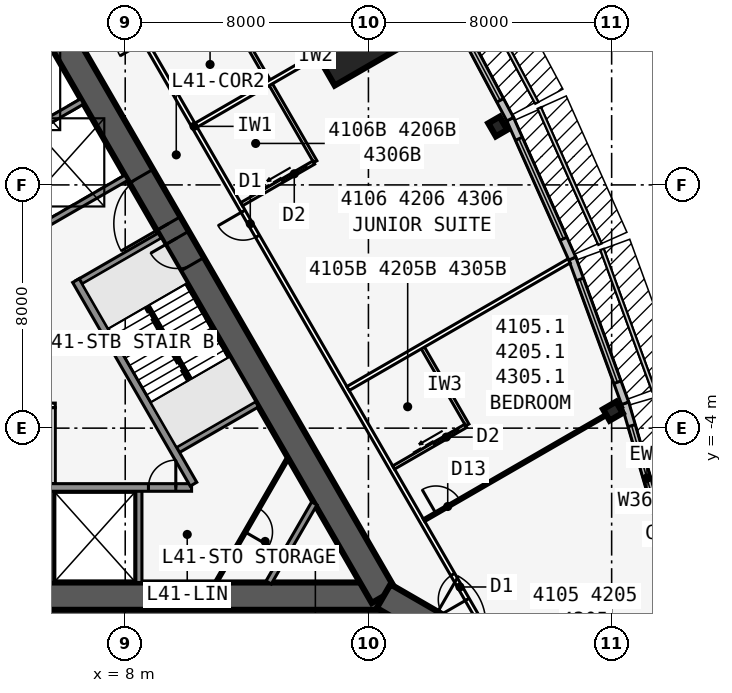
"""IFC4 building model, lengths in metres.
Left out: names, types, materials, properties, quantities, classifications, styles, units other than length and angle.
Written with IfcOpenShell. Run it as: python <this file> out.ifc"""

import sys

from ifc_helpers import new_model, si_unit, direction, frame, frame_2d, origin, origin_2d, place, context, subcontext, project, spatial, rectangle, i_section, extrude, element, fill, save


model = new_model("IFC4")
c1 = context("Model", 3, precision=1e-05, world=origin(), true_north=direction((0.0, 1.0)))
c2 = subcontext(c1, "Body", "Model", "MODEL_VIEW")
j1 = project(units=[si_unit("LENGTHUNIT", "METRE"), si_unit("PLANEANGLEUNIT", "RADIAN")], contexts=[c1])
p1 = place(None, origin())
s1 = spatial("IfcSite", under=j1, at=p1, CompositionType="ELEMENT")
p2 = place(p1, origin())
s2 = spatial("IfcBuilding", under=s1, at=p2, CompositionType="ELEMENT")
p3 = place(p2, frame((0.0, 0.0, 155.5)))
s3 = spatial("IfcBuildingStorey", under=s2, at=p3, CompositionType="ELEMENT", Elevation=155.5)
p4 = place(p3, frame((-16.5, -9.526, 0.0), z_axis=(0.0, 0.0, 1.0), x_axis=(1.0, 0.0, 0.0)))
e1 = element("IfcWall", 1, at=p4, inside=s3, PredefinedType="SHEAR", context=c2, shape_type="SweptSolid", body=[
    extrude(rectangle(XDim=33.0, YDim=0.9, at=frame_2d((16.5, 0.0))), origin(), (0.0, 0.0, 1.0), 3.4),
])
p5 = place(p4, frame((14.05, 0.0, 0.0)))
e2 = element("IfcOpeningElement", 2, at=p5, cuts=e1, PredefinedType="OPENING", context=c2, shape_type="SweptSolid", body=[
    extrude(rectangle(XDim=1.8, YDim=2.13, at=frame_2d((0.9, 1.065))), frame((0.0, 0.46, 0.0), z_axis=(0.0, -1.0, 0.0), x_axis=(1.0, 0.0, 0.0)), (0.0, 0.0, 1.0), 0.92),
])
p6 = place(p3, frame((-0.55, -5.951, 0.0), z_axis=(0.0, 0.0, 1.0), x_axis=(1.0, 0.0, 0.0)))
e3 = element("IfcWall", 3, at=p6, inside=s3, PredefinedType="SOLIDWALL", context=c2, shape_type="SweptSolid", body=[
    extrude(rectangle(XDim=10.733, YDim=0.25, at=frame_2d((5.366, 0.0))), origin(), (0.0, 0.0, 1.0), 3.235),
])
p7 = place(p6, frame((9.314, 0.0, 0.0)))
e4 = element("IfcOpeningElement", 4, at=p7, cuts=e3, PredefinedType="OPENING", context=c2, shape_type="SweptSolid", body=[
    extrude(rectangle(XDim=0.9, YDim=2.13, at=frame_2d((0.45, 1.065))), frame((0.0, 0.135, 0.0), z_axis=(0.0, -1.0, 0.0), x_axis=(1.0, 0.0, 0.0)), (0.0, 0.0, 1.0), 0.27),
])
p8 = place(p6, frame((1.05, 0.0, 0.0)))
e5 = element("IfcOpeningElement", 5, at=p8, cuts=e3, PredefinedType="OPENING", context=c2, shape_type="SweptSolid", body=[
    extrude(rectangle(XDim=1.1, YDim=2.13, at=frame_2d((0.55, 1.065))), frame((0.0, 0.135, 0.0), z_axis=(0.0, -1.0, 0.0), x_axis=(1.0, 0.0, 0.0)), (0.0, 0.0, 1.0), 0.27),
])
p9 = place(p6, frame((4.05, 0.0, 0.0)))
e6 = element("IfcOpeningElement", 6, at=p9, cuts=e3, PredefinedType="OPENING", context=c2, shape_type="SweptSolid", body=[
    extrude(rectangle(XDim=1.1, YDim=2.13, at=frame_2d((0.55, 1.065))), frame((0.0, 0.135, 0.0), z_axis=(0.0, -1.0, 0.0), x_axis=(1.0, 0.0, 0.0)), (0.0, 0.0, 1.0), 0.27),
])
for number, where, z_axis, x_axis in (
    (7, (5.55, -5.951, 0.0), (0.0, 0.0, 1.0), (0.0, -1.0, 0.0)),
    (8, (8.45, -5.951, 0.0), (0.0, 0.0, 1.0), (0.0, -1.0, 0.0)),
):
    element("IfcWall", number, at=place(p3, frame(where, z_axis=z_axis, x_axis=x_axis)), inside=s3, PredefinedType="SOLIDWALL", context=c2, shape_type="SweptSolid", body=[
        extrude(rectangle(XDim=3.125, YDim=0.2, at=frame_2d((1.562, 0.0))), origin(), (0.0, 0.0, 1.0), 3.235),
    ])
p10 = place(p3, frame((16.5, -9.526, 0.0), z_axis=(0.0, 0.0, 1.0), x_axis=(-0.499999749417, 0.866025548458, 0.0)))
e9 = element("IfcWall", 9, at=p10, inside=s3, PredefinedType="SHEAR", context=c2, shape_type="SweptSolid", body=[
    extrude(rectangle(XDim=33.0, YDim=0.9, at=frame_2d((16.5, 0.0))), origin(), (0.0, 0.0, 1.0), 3.4),
])
p11 = place(p10, frame((14.15, 0.0, 0.0)))
e10 = element("IfcOpeningElement", 10, at=p11, cuts=e9, PredefinedType="OPENING", context=c2, shape_type="SweptSolid", body=[
    extrude(rectangle(XDim=1.8, YDim=2.13, at=frame_2d((0.9, 1.065))), frame((0.0, 0.46, 0.0), z_axis=(0.0, -1.0, 0.0), x_axis=(1.0, 0.0, 0.0)), (0.0, 0.0, 1.0), 0.92),
])
p12 = place(p10, frame((12.6, 0.0, 0.0)))
e11 = element("IfcOpeningElement", 11, at=p12, cuts=e9, PredefinedType="OPENING", context=c2, shape_type="SweptSolid", body=[
    extrude(rectangle(XDim=1.0, YDim=2.13, at=frame_2d((0.5, 1.065))), frame((0.0, 0.46, 0.0), z_axis=(0.0, -1.0, 0.0), x_axis=(1.0, 0.0, 0.0)), (0.0, 0.0, 1.0), 0.92),
])
p13 = place(p3, frame((10.245, -5.843, 0.0), z_axis=(0.0, 0.0, 1.0), x_axis=(-0.499993009313, 0.866029439822, 0.0)))
e12 = element("IfcWall", 12, at=p13, inside=s3, PredefinedType="SOLIDWALL", context=c2, shape_type="SweptSolid", body=[
    extrude(rectangle(XDim=7.733, YDim=0.25, at=frame_2d((3.866, 0.0))), origin(), (0.0, 0.0, 1.0), 3.235),
])
for number, where, z_axis, x_axis in (
    (13, (9.629, -4.775, 0.0), (0.0, 0.0, 1.0), (0.866, 0.5, 0.0)),
    (14, (6.429, 0.767, 0.0), (0.0, 0.0, 1.0), (0.866, 0.5, 0.0)),
    (15, (5.329, 2.673, 0.0), (0.0, 0.0, 1.0), (0.866, 0.5, 0.0)),
    (16, (3.879, 5.184, 0.0), (0.0, 0.0, 1.0), (0.866, 0.5, 0.0)),
):
    element("IfcWall", number, at=place(p3, frame(where, z_axis=z_axis, x_axis=x_axis)), inside=s3, PredefinedType="SOLIDWALL", context=c2, shape_type="SweptSolid", body=[
        extrude(rectangle(XDim=3.125, YDim=0.2, at=frame_2d((1.562, 0.0))), origin(), (0.0, 0.0, 1.0), 3.235),
    ])
p14 = place(p3, frame((16.5, -9.526, 0.0), z_axis=(0.0, 0.0, 1.0), x_axis=(0.866031398331, -0.499989616998, 0.0)))
e17 = element("IfcWall", 17, at=p14, inside=s3, PredefinedType="SHEAR", context=c2, shape_type="SweptSolid", body=[
    extrude(rectangle(XDim=4.746, YDim=0.9, at=frame_2d((2.373, 0.0))), origin(), (0.0, 0.0, 1.0), 3.4),
])
p15 = place(p14, frame((1.8, 0.0, 0.0)))
e18 = element("IfcOpeningElement", 18, at=p15, cuts=e17, PredefinedType="OPENING", context=c2, shape_type="SweptSolid", body=[
    extrude(rectangle(XDim=1.8, YDim=2.13, at=frame_2d((0.9, 1.065))), frame((0.0, 0.46, 0.0), z_axis=(0.0, -1.0, 0.0), x_axis=(1.0, 0.0, 0.0)), (0.0, 0.0, 1.0), 0.92),
])
for number, where, z_axis, x_axis in (
    (19, (24.041, -3.44, 0.0), (0.0, 0.0, 1.0), (-0.5, 0.866, 0.0)),
    (20, (20.254, 5.92, 0.0), (0.0, 0.0, 1.0), (0.866, 0.5, 0.0)),
):
    element("IfcColumn", number, at=place(p3, frame(where, z_axis=z_axis, x_axis=x_axis)), inside=s3, PredefinedType="COLUMN", context=c2, shape_type="SweptSolid", body=[
        extrude(i_section(OverallWidth=0.432, OverallDepth=0.498, WebThickness=0.056, FlangeThickness=0.089, at=origin_2d()), origin(), (0.0, 0.0, 1.0), 3.4),
    ])
p16 = place(p3, frame((15.312, 8.84, 0.0), z_axis=(0.0, 0.0, 1.0), x_axis=(0.866025403784, 0.5, 0.0)))
e21 = element("IfcColumn", 21, at=p16, inside=s3, PredefinedType="COLUMN", context=c2, shape_type="SweptSolid", body=[
    extrude(rectangle(XDim=2.3, YDim=2.3, at=origin_2d()), origin(), (0.0, 0.0, 1.0), 3.4),
])
p17 = place(p3, frame((25.88, -8.118, 0.0), z_axis=(0.0, 0.0, 1.0), x_axis=(-0.279528287117, 0.960137457191, 0.0)))
e22 = element("IfcWall", 22, at=p17, inside=s3, PredefinedType="STANDARD", context=c2, shape_type="SweptSolid", body=[
    extrude(rectangle(XDim=5.148, YDim=0.25, at=frame_2d((2.574, 0.0))), origin(), (0.0, 0.0, 1.0), 3.235),
])
p18 = place(p17, frame((0.774, 0.0, 0.45)))
e23 = element("IfcOpeningElement", 23, at=p18, cuts=e22, PredefinedType="OPENING", context=c2, shape_type="SweptSolid", body=[
    extrude(rectangle(XDim=3.6, YDim=2.4, at=frame_2d((1.8, 1.2))), frame((0.0, 0.135, 0.0), z_axis=(0.0, -1.0, 0.0), x_axis=(1.0, 0.0, 0.0)), (0.0, 0.0, 1.0), 0.27),
])
p19 = place(p3, frame((24.444, -3.183, 0.0), z_axis=(0.0, 0.0, 1.0), x_axis=(-0.343225593282, 0.939252996863, 0.0)))
e24 = element("IfcWall", 24, at=p19, inside=s3, PredefinedType="STANDARD", context=c2, shape_type="SweptSolid", body=[
    extrude(rectangle(XDim=5.076, YDim=0.25, at=frame_2d((2.538, 0.0))), origin(), (0.0, 0.0, 1.0), 3.235),
])
p20 = place(p19, frame((0.738, 0.0, 0.45)))
e25 = element("IfcOpeningElement", 25, at=p20, cuts=e24, PredefinedType="OPENING", context=c2, shape_type="SweptSolid", body=[
    extrude(rectangle(XDim=3.6, YDim=2.4, at=frame_2d((1.8, 1.2))), frame((0.0, 0.135, 0.0), z_axis=(0.0, -1.0, 0.0), x_axis=(1.0, 0.0, 0.0)), (0.0, 0.0, 1.0), 0.27),
])
p21 = place(p3, frame((22.705, 1.576, 0.0), z_axis=(0.0, 0.0, 1.0), x_axis=(-0.406832200364, 0.913502906808, 0.0)))
e26 = element("IfcWall", 26, at=p21, inside=s3, PredefinedType="STANDARD", context=c2, shape_type="SweptSolid", body=[
    extrude(rectangle(XDim=5.028, YDim=0.25, at=frame_2d((2.514, 0.0))), origin(), (0.0, 0.0, 1.0), 3.235),
])
p22 = place(p21, frame((0.714, 0.0, 0.45)))
e27 = element("IfcOpeningElement", 27, at=p22, cuts=e26, PredefinedType="OPENING", context=c2, shape_type="SweptSolid", body=[
    extrude(rectangle(XDim=3.6, YDim=2.4, at=frame_2d((1.8, 1.2))), frame((0.0, 0.135, 0.0), z_axis=(0.0, -1.0, 0.0), x_axis=(1.0, 0.0, 0.0)), (0.0, 0.0, 1.0), 0.27),
])
p23 = place(p3, frame((20.663, 6.161, 0.0), z_axis=(0.0, 0.0, 1.0), x_axis=(-0.469404966864, 0.882982999317, 0.0)))
e28 = element("IfcWall", 28, at=p23, inside=s3, PredefinedType="STANDARD", context=c2, shape_type="SweptSolid", body=[
    extrude(rectangle(XDim=5.003, YDim=0.25, at=frame_2d((2.501, 0.0))), origin(), (0.0, 0.0, 1.0), 3.235),
])
p24 = place(p23, frame((0.701, 0.0, 0.45)))
e29 = element("IfcOpeningElement", 29, at=p24, cuts=e28, PredefinedType="OPENING", context=c2, shape_type="SweptSolid", body=[
    extrude(rectangle(XDim=3.6, YDim=2.4, at=frame_2d((1.8, 1.2))), frame((0.0, 0.135, 0.0), z_axis=(0.0, -1.0, 0.0), x_axis=(1.0, 0.0, 0.0)), (0.0, 0.0, 1.0), 0.27),
])
p25 = place(p3, frame((20.027, -10.985, 0.0), z_axis=(0.0, 0.0, 1.0), x_axis=(-0.500001677587, 0.866024435227, 0.0)))
e30 = element("IfcWall", 30, at=p25, inside=s3, PredefinedType="PARTITIONING", context=c2, shape_type="SweptSolid", body=[
    extrude(rectangle(XDim=39.054, YDim=0.15, at=frame_2d((19.527, 0.0))), origin(), (0.0, 0.0, 1.0), 3.235),
])
p26 = place(p25, frame((1.558, 0.0, 0.0)))
e31 = element("IfcOpeningElement", 31, at=p26, cuts=e30, PredefinedType="OPENING", context=c2, shape_type="SweptSolid", body=[
    extrude(rectangle(XDim=0.95, YDim=2.13, at=frame_2d((0.475, 1.065))), frame((0.0, 0.085, 0.0), z_axis=(0.0, -1.0, 0.0), x_axis=(1.0, 0.0, 0.0)), (0.0, 0.0, 1.0), 0.17),
])
p27 = place(p25, frame((15.352, 0.0, 0.0)))
e32 = element("IfcOpeningElement", 32, at=p27, cuts=e30, PredefinedType="OPENING", context=c2, shape_type="SweptSolid", body=[
    extrude(rectangle(XDim=0.95, YDim=2.13, at=frame_2d((0.475, 1.065))), frame((0.0, 0.085, 0.0), z_axis=(0.0, -1.0, 0.0), x_axis=(1.0, 0.0, 0.0)), (0.0, 0.0, 1.0), 0.17),
])
p28 = place(p25, frame((22.752, 0.0, 0.0)))
e33 = element("IfcOpeningElement", 33, at=p28, cuts=e30, PredefinedType="OPENING", context=c2, shape_type="SweptSolid", body=[
    extrude(rectangle(XDim=0.95, YDim=2.13, at=frame_2d((0.475, 1.065))), frame((0.0, 0.085, 0.0), z_axis=(0.0, -1.0, 0.0), x_axis=(1.0, 0.0, 0.0)), (0.0, 0.0, 1.0), 0.17),
])
p29 = place(p25, frame((30.952, 0.0, 0.0)))
e34 = element("IfcOpeningElement", 34, at=p29, cuts=e30, PredefinedType="OPENING", context=c2, shape_type="SweptSolid", body=[
    extrude(rectangle(XDim=0.95, YDim=2.13, at=frame_2d((0.475, 1.065))), frame((0.0, 0.085, 0.0), z_axis=(0.0, -1.0, 0.0), x_axis=(1.0, 0.0, 0.0)), (0.0, 0.0, 1.0), 0.17),
])
p30 = place(p25, frame((37.752, 0.0, 0.0)))
e35 = element("IfcOpeningElement", 35, at=p30, cuts=e30, PredefinedType="OPENING", context=c2, shape_type="SweptSolid", body=[
    extrude(rectangle(XDim=0.95, YDim=2.13, at=frame_2d((0.475, 1.065))), frame((0.0, 0.085, 0.0), z_axis=(0.0, -1.0, 0.0), x_axis=(1.0, 0.0, 0.0)), (0.0, 0.0, 1.0), 0.17),
])
p31 = place(p3, frame((17.829, -7.027, 0.0), z_axis=(0.0, 0.0, 1.0), x_axis=(0.866029804378, 0.499992377871, 0.0)))
e36 = element("IfcWall", 36, at=p31, inside=s3, PredefinedType="PARTITIONING", context=c2, shape_type="SweptSolid", body=[
    extrude(rectangle(XDim=7.516, YDim=0.1, at=frame_2d((3.758, 0.0))), origin(), (0.0, 0.0, 1.0), 2.389),
])
p32 = place(p31, frame((0.45, 0.0, 0.0)))
e37 = element("IfcOpeningElement", 37, at=p32, cuts=e36, PredefinedType="OPENING", context=c2, shape_type="SweptSolid", body=[
    extrude(rectangle(XDim=0.9, YDim=2.13, at=frame_2d((0.45, 1.065))), frame((0.0, 0.06, 0.0), z_axis=(0.0, -1.0, 0.0), x_axis=(1.0, 0.0, 0.0)), (0.0, 0.0, 1.0), 0.12),
])
p33 = place(p3, frame((15.329, -2.697, 0.0), z_axis=(0.0, 0.0, 1.0), x_axis=(0.866024316602, 0.50000188305, 0.0)))
e38 = element("IfcWall", 38, at=p33, inside=s3, PredefinedType="PARTITIONING", context=c2, shape_type="SweptSolid", body=[
    extrude(rectangle(XDim=8.395, YDim=0.15, at=frame_2d((4.198, 0.0))), origin(), (0.0, 0.0, 1.0), 2.389),
])
p34 = place(p3, frame((10.329, 5.963, 0.0), z_axis=(0.0, 0.0, 1.0), x_axis=(0.866025170687, 0.500000403736, 0.0)))
e39 = element("IfcWall", 39, at=p34, inside=s3, PredefinedType="PARTITIONING", context=c2, shape_type="SweptSolid", body=[
    extrude(rectangle(XDim=9.099, YDim=0.15, at=frame_2d((4.549, 0.0))), origin(), (0.0, 0.0, 1.0), 2.389),
])
p35 = place(p3, frame((19.253, -3.895, 0.0), z_axis=(0.0, 0.0, 1.0), x_axis=(-0.499990139034, 0.866031096941, 0.0)))
e40 = element("IfcWall", 40, at=p35, inside=s3, PredefinedType="PLUMBINGWALL", context=c2, shape_type="SweptSolid", body=[
    extrude(rectangle(XDim=3.0, YDim=0.12, at=frame_2d((1.5, 0.0))), origin(), (0.0, 0.0, 1.0), 3.235),
])
p36 = place(p3, frame((16.829, -5.295, 0.0), z_axis=(0.0, 0.0, 1.0), x_axis=(0.866035715982, 0.499982138324, 0.0)))
e41 = element("IfcWall", 41, at=p36, inside=s3, PredefinedType="PLUMBINGWALL", context=c2, shape_type="SweptSolid", body=[
    extrude(rectangle(XDim=2.74, YDim=0.12, at=frame_2d((1.37, 0.0))), origin(), (0.0, 0.0, 1.0), 3.235),
])
p37 = place(p36, frame((1.55, 0.0, 0.0)))
e42 = element("IfcOpeningElement", 42, at=p37, cuts=e41, PredefinedType="OPENING", context=c2, shape_type="SweptSolid", body=[
    extrude(rectangle(XDim=0.9, YDim=2.13, at=frame_2d((0.45, 1.065))), frame((0.0, 0.07, 0.0), z_axis=(0.0, -1.0, 0.0), x_axis=(1.0, 0.0, 0.0)), (0.0, 0.0, 1.0), 0.14),
])
p38 = place(p3, frame((14.253, 4.765, 0.0), z_axis=(0.0, 0.0, 1.0), x_axis=(-0.50002537861, 0.866010750942, 0.0)))
e43 = element("IfcWall", 43, at=p38, inside=s3, PredefinedType="PLUMBINGWALL", context=c2, shape_type="SweptSolid", body=[
    extrude(rectangle(XDim=3.0, YDim=0.12, at=frame_2d((1.5, 0.0))), origin(), (0.0, 0.0, 1.0), 3.235),
])
p39 = place(p3, frame((11.829, 3.365, 0.0), z_axis=(0.0, 0.0, 1.0), x_axis=(0.865997131366, 0.500048966069, 0.0)))
e44 = element("IfcWall", 44, at=p39, inside=s3, PredefinedType="PLUMBINGWALL", context=c2, shape_type="SweptSolid", body=[
    extrude(rectangle(XDim=2.74, YDim=0.12, at=frame_2d((1.37, 0.0))), origin(), (0.0, 0.0, 1.0), 3.235),
])
p40 = place(p39, frame((1.55, 0.0, 0.0)))
e45 = element("IfcOpeningElement", 45, at=p40, cuts=e44, PredefinedType="OPENING", context=c2, shape_type="SweptSolid", body=[
    extrude(rectangle(XDim=0.9, YDim=2.13, at=frame_2d((0.45, 1.065))), frame((0.0, 0.07, 0.0), z_axis=(0.0, -1.0, 0.0), x_axis=(1.0, 0.0, 0.0)), (0.0, 0.0, 1.0), 0.14),
])
p41 = place(p3, frame((12.753, 7.363, 0.0), z_axis=(0.0, 0.0, 1.0), x_axis=(-0.499990139034, 0.866031096941, 0.0)))
e46 = element("IfcWall", 46, at=p41, inside=s3, PredefinedType="PLUMBINGWALL", context=c2, shape_type="SweptSolid", body=[
    extrude(rectangle(XDim=3.0, YDim=0.12, at=frame_2d((1.5, 0.0))), origin(), (0.0, 0.0, 1.0), 3.235),
])
p42 = place(p3, frame((-2.65, -3.251, 0.0), z_axis=(0.0, 0.0, 1.0), x_axis=(1.0, 0.0, 0.0)))
e47 = element("IfcWall", 47, at=p42, inside=s3, PredefinedType="PARTITIONING", context=c2, shape_type="SweptSolid", body=[
    extrude(rectangle(XDim=8.35, YDim=0.15, at=frame_2d((4.175, 0.0))), origin(), (0.0, 0.0, 1.0), 3.235),
])
p43 = place(p3, frame((5.625, -5.826, 0.0), z_axis=(0.0, 0.0, 1.0), x_axis=(0.0, 1.0, 0.0)))
e48 = element("IfcWall", 48, at=p43, inside=s3, PredefinedType="PARTITIONING", context=c2, shape_type="SweptSolid", body=[
    extrude(rectangle(XDim=2.5, YDim=0.15, at=frame_2d((1.25, 0.0))), origin(), (0.0, 0.0, 1.0), 3.235),
])
p44 = place(p3, frame((14.219, -6.476, 0.0), z_axis=(0.0, 0.0, 1.0), x_axis=(-0.499952404951, -0.866052881055, 0.0)))
e49 = element("IfcWall", 49, at=p44, inside=s3, PredefinedType="SOLIDWALL", context=c2, shape_type="SweptSolid", body=[
    extrude(rectangle(XDim=3.002, YDim=0.2, at=frame_2d((1.501, 0.0))), origin(), (0.0, 0.0, 1.0), 3.235),
])
p45 = place(p3, frame((13.354, -4.976, 0.0), z_axis=(0.0, 0.0, 1.0), x_axis=(-0.499999210213, -0.866025859768, 0.0)))
e50 = element("IfcWall", 50, at=p45, inside=s3, PredefinedType="PARTITIONING", context=c2, shape_type="SweptSolid", body=[
    extrude(rectangle(XDim=4.734, YDim=0.1, at=frame_2d((2.367, 0.0))), origin(), (0.0, 0.0, 1.0), 3.235),
])
p46 = place(p45, frame((1.917, 0.0, 0.0)))
e51 = element("IfcOpeningElement", 51, at=p46, cuts=e50, PredefinedType="OPENING", context=c2, shape_type="SweptSolid", body=[
    extrude(rectangle(XDim=0.9, YDim=2.13, at=frame_2d((0.45, 1.065))), frame((0.0, 0.06, 0.0), z_axis=(0.0, -1.0, 0.0), x_axis=(1.0, 0.0, 0.0)), (0.0, 0.0, 1.0), 0.12),
])
p47 = place(p3, frame((10.135, -2.401, 0.0), z_axis=(0.0, 0.0, 1.0), x_axis=(-0.499992232847, 0.866029888106, 0.0)))
e52 = element("IfcWall", 52, at=p47, inside=s3, PredefinedType="SOLIDWALL", context=c2, shape_type="SweptSolid", body=[
    extrude(rectangle(XDim=2.794, YDim=0.1, at=frame_2d((1.397, 0.0))), origin(), (0.0, 0.0, 1.0), 3.4),
])
p48 = place(p18, origin())
e53 = element("IfcWindow", 53, at=p48, inside=s3, PartitioningType="SINGLE_PANEL", PredefinedType="WINDOW", context=c2, shape_type="SweptSolid", body=[
    extrude(rectangle(XDim=3.6, YDim=2.4, at=frame_2d((1.8, 1.2))), frame((0.0, 0.03, 0.0), z_axis=(0.0, -1.0, 0.0), x_axis=(1.0, 0.0, 0.0)), (0.0, 0.0, 1.0), 0.06),
])
fill(e23, e53)
p49 = place(p20, origin())
e54 = element("IfcWindow", 54, at=p49, inside=s3, PartitioningType="SINGLE_PANEL", PredefinedType="WINDOW", context=c2, shape_type="SweptSolid", body=[
    extrude(rectangle(XDim=3.6, YDim=2.4, at=frame_2d((1.8, 1.2))), frame((0.0, 0.03, 0.0), z_axis=(0.0, -1.0, 0.0), x_axis=(1.0, 0.0, 0.0)), (0.0, 0.0, 1.0), 0.06),
])
fill(e25, e54)
p50 = place(p22, origin())
e55 = element("IfcWindow", 55, at=p50, inside=s3, PartitioningType="SINGLE_PANEL", PredefinedType="WINDOW", context=c2, shape_type="SweptSolid", body=[
    extrude(rectangle(XDim=3.6, YDim=2.4, at=frame_2d((1.8, 1.2))), frame((0.0, 0.03, 0.0), z_axis=(0.0, -1.0, 0.0), x_axis=(1.0, 0.0, 0.0)), (0.0, 0.0, 1.0), 0.06),
])
fill(e27, e55)
p51 = place(p24, origin())
e56 = element("IfcWindow", 56, at=p51, inside=s3, PartitioningType="SINGLE_PANEL", PredefinedType="WINDOW", context=c2, shape_type="SweptSolid", body=[
    extrude(rectangle(XDim=3.6, YDim=2.4, at=frame_2d((1.8, 1.2))), frame((0.0, 0.03, 0.0), z_axis=(0.0, -1.0, 0.0), x_axis=(1.0, 0.0, 0.0)), (0.0, 0.0, 1.0), 0.06),
])
fill(e29, e56)
p52 = place(p32, origin())
e57 = element("IfcDoor", 57, at=p52, inside=s3, OperationType="SINGLE_SWING_LEFT", PredefinedType="DOOR", context=c2, shape_type="SweptSolid", body=[
    extrude(rectangle(XDim=0.9, YDim=2.13, at=frame_2d((0.45, 1.065))), frame((0.0, 0.025, 0.0), z_axis=(0.0, -1.0, 0.0), x_axis=(1.0, 0.0, 0.0)), (0.0, 0.0, 1.0), 0.05),
])
fill(e37, e57)
p53 = place(p26, origin())
e58 = element("IfcDoor", 58, at=p53, inside=s3, OperationType="SINGLE_SWING_LEFT", PredefinedType="DOOR", context=c2, shape_type="SweptSolid", body=[
    extrude(rectangle(XDim=0.95, YDim=2.13, at=frame_2d((0.475, 1.065))), frame((0.0, 0.025, 0.0), z_axis=(0.0, -1.0, 0.0), x_axis=(1.0, 0.0, 0.0)), (0.0, 0.0, 1.0), 0.05),
])
fill(e31, e58)
p54 = place(p37, origin())
e59 = element("IfcDoor", 59, at=p54, inside=s3, OperationType="SLIDING_TO_LEFT", PredefinedType="DOOR", context=c2, shape_type="SweptSolid", body=[
    extrude(rectangle(XDim=0.9, YDim=2.13, at=frame_2d((0.45, 1.065))), frame((0.0, 0.025, 0.0), z_axis=(0.0, -1.0, 0.0), x_axis=(1.0, 0.0, 0.0)), (0.0, 0.0, 1.0), 0.05),
])
fill(e42, e59)
p55 = place(p40, origin())
e60 = element("IfcDoor", 60, at=p55, inside=s3, OperationType="SLIDING_TO_LEFT", PredefinedType="DOOR", context=c2, shape_type="SweptSolid", body=[
    extrude(rectangle(XDim=0.9, YDim=2.13, at=frame_2d((0.45, 1.065))), frame((0.0, 0.025, 0.0), z_axis=(0.0, -1.0, 0.0), x_axis=(1.0, 0.0, 0.0)), (0.0, 0.0, 1.0), 0.05),
])
fill(e45, e60)
p56 = place(p27, origin())
e61 = element("IfcDoor", 61, at=p56, inside=s3, OperationType="SINGLE_SWING_RIGHT", PredefinedType="DOOR", context=c2, shape_type="SweptSolid", body=[
    extrude(rectangle(XDim=0.95, YDim=2.13, at=frame_2d((0.475, 1.065))), frame((0.0, 0.025, 0.0), z_axis=(0.0, -1.0, 0.0), x_axis=(1.0, 0.0, 0.0)), (0.0, 0.0, 1.0), 0.05),
])
fill(e32, e61)
p57 = place(p11, origin())
e62 = element("IfcDoor", 62, at=p57, inside=s3, OperationType="DOUBLE_DOOR_SINGLE_SWING", PredefinedType="DOOR", context=c2, shape_type="SweptSolid", body=[
    extrude(rectangle(XDim=1.8, YDim=2.13, at=frame_2d((0.9, 1.065))), frame((0.0, 0.025, 0.0), z_axis=(0.0, -1.0, 0.0), x_axis=(1.0, 0.0, 0.0)), (0.0, 0.0, 1.0), 0.05),
])
fill(e10, e62)
p58 = place(p12, origin())
e63 = element("IfcDoor", 63, at=p58, inside=s3, OperationType="SINGLE_SWING_RIGHT", PredefinedType="DOOR", context=c2, shape_type="SweptSolid", body=[
    extrude(rectangle(XDim=1.0, YDim=2.13, at=frame_2d((0.5, 1.065))), frame((0.0, 0.025, 0.0), z_axis=(0.0, -1.0, 0.0), x_axis=(1.0, 0.0, 0.0)), (0.0, 0.0, 1.0), 0.05),
])
fill(e11, e63)
p59 = place(p46, origin())
e64 = element("IfcDoor", 64, at=p59, inside=s3, OperationType="SINGLE_SWING_RIGHT", PredefinedType="DOOR", context=c2, shape_type="SweptSolid", body=[
    extrude(rectangle(XDim=0.9, YDim=2.13, at=frame_2d((0.45, 1.065))), frame((0.0, 0.025, 0.0), z_axis=(0.0, -1.0, 0.0), x_axis=(1.0, 0.0, 0.0)), (0.0, 0.0, 1.0), 0.05),
])
fill(e51, e64)
p60 = place(p7, origin())
e65 = element("IfcDoor", 65, at=p60, inside=s3, OperationType="SINGLE_SWING_RIGHT", PredefinedType="DOOR", context=c2, shape_type="SweptSolid", body=[
    extrude(rectangle(XDim=0.9, YDim=2.13, at=frame_2d((0.45, 1.065))), frame((0.0, 0.025, 0.0), z_axis=(0.0, -1.0, 0.0), x_axis=(1.0, 0.0, 0.0)), (0.0, 0.0, 1.0), 0.05),
])
fill(e4, e65)
save(model, sys.argv[1])
